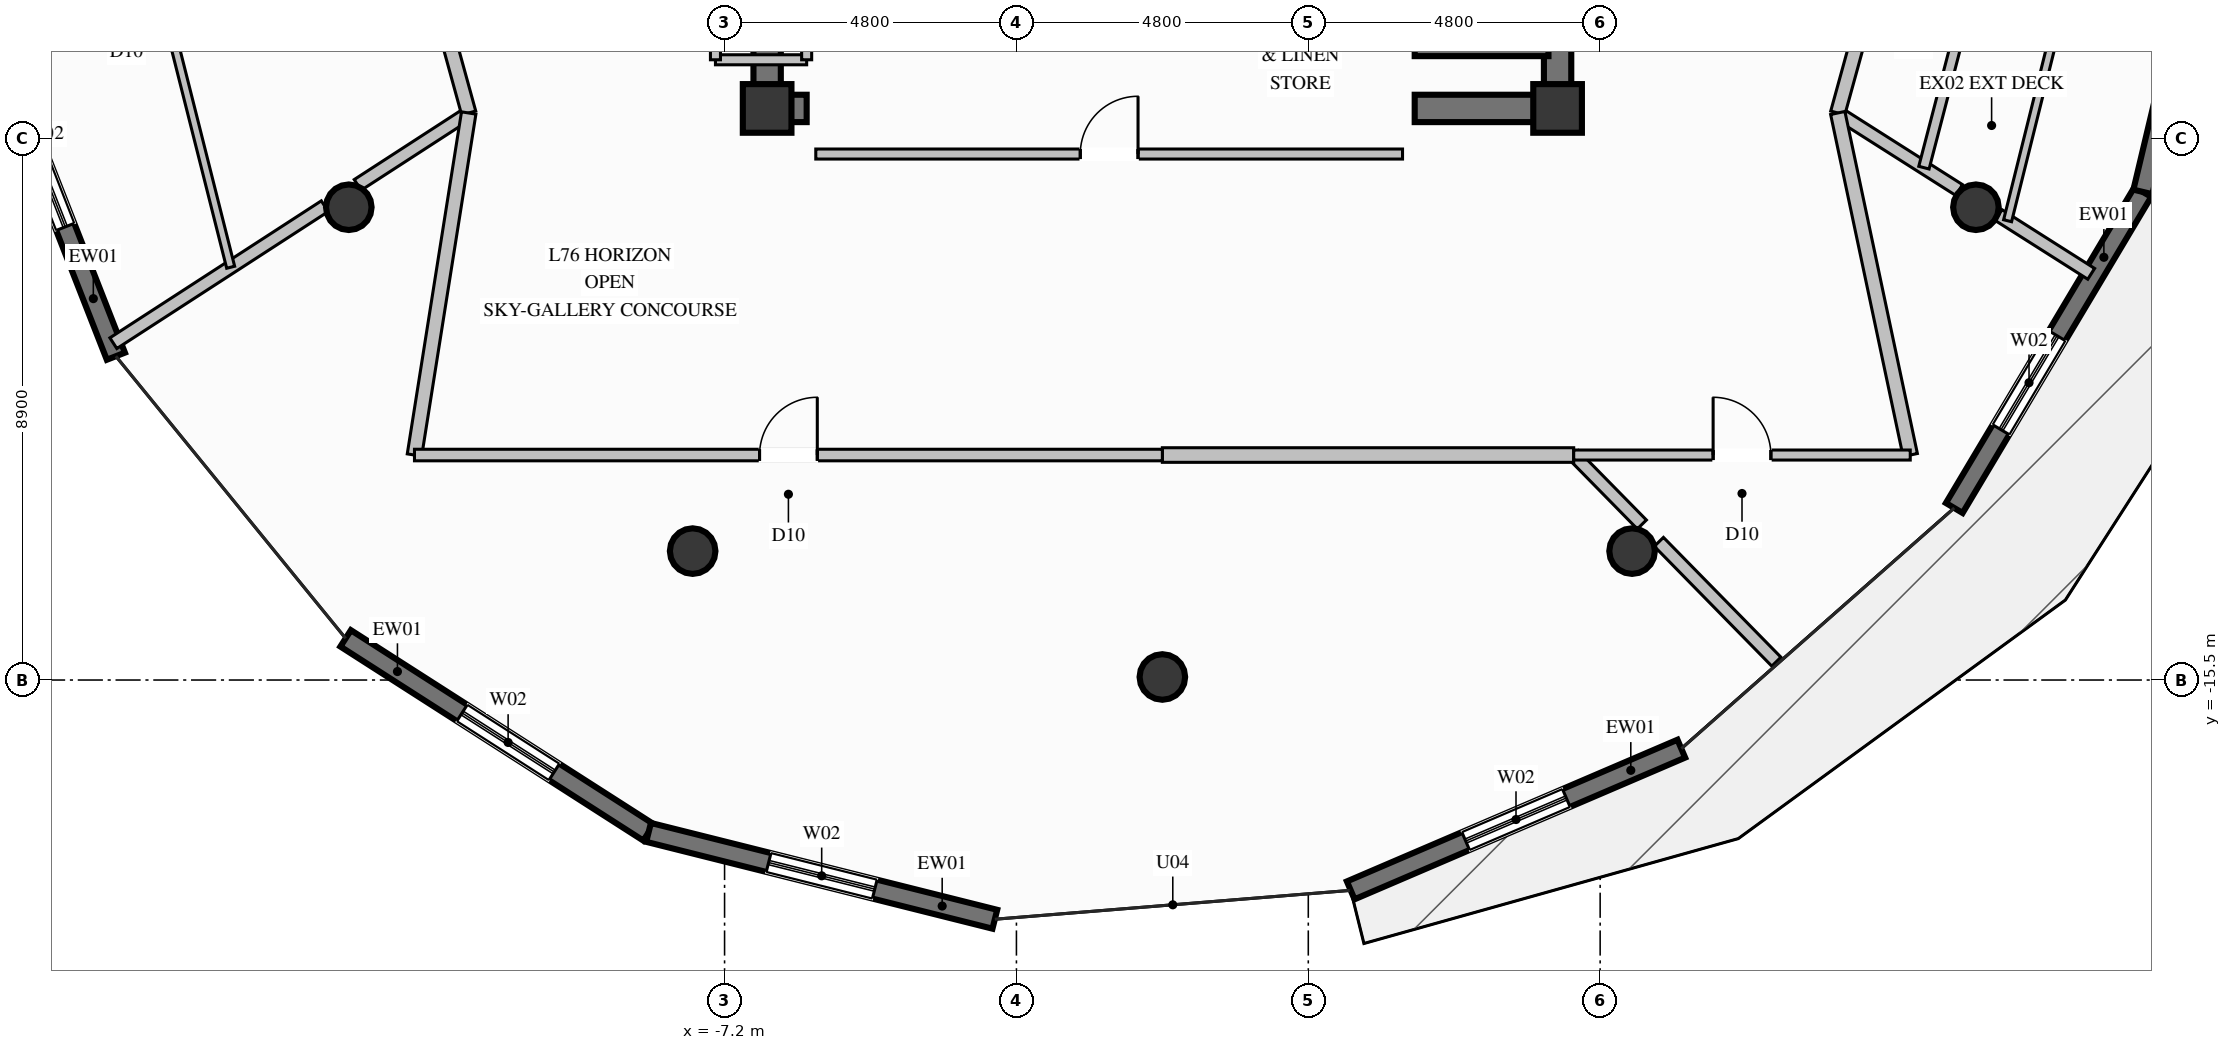
"""IFC4 building model, lengths in metres.
Left out: names, types, materials, properties, quantities, classifications, styles, units other than length and angle.
Written with IfcOpenShell. Run it as: python <this file> out.ifc"""

import sys

from ifc_helpers import new_model, si_unit, direction, frame, frame_2d, origin, origin_2d, place, context, subcontext, project, spatial, rectangle, circle, extrude, element, fill, save


model = new_model("IFC4")
c1 = context("Model", 3, precision=1e-05, world=origin(), true_north=direction((0.0, 1.0)))
c2 = subcontext(c1, "Body", "Model", "MODEL_VIEW")
j1 = project(units=[si_unit("LENGTHUNIT", "METRE"), si_unit("PLANEANGLEUNIT", "RADIAN")], contexts=[c1])
p1 = place(None, origin())
s1 = spatial("IfcSite", under=j1, at=p1, CompositionType="ELEMENT")
p2 = place(p1, origin())
s2 = spatial("IfcBuilding", under=s1, at=p2, CompositionType="ELEMENT")
p3 = place(p2, frame((0.0, 0.0, 293.4)))
s3 = spatial("IfcBuildingStorey", under=s2, at=p3, CompositionType="ELEMENT", Elevation=293.4)
for number, where, z_axis, x_axis in (
    (1, (-6.5, -6.1, 0.0), (0.0, 0.0, 1.0), (1.0, 0.0, 0.0)),
    (2, (6.5, -6.1, 0.0), (0.0, 0.0, 1.0), (1.0, 0.0, 0.0)),
):
    element("IfcColumn", number, at=place(p3, frame(where, z_axis=z_axis, x_axis=x_axis)), inside=s3, PredefinedType="COLUMN", context=c2, shape_type="SweptSolid", body=[
        extrude(rectangle(XDim=0.8, YDim=0.8, at=origin_2d()), origin(), (0.0, 0.0, 1.0), 3.8),
    ])
p4 = place(p3, frame((-6.275, -6.1, 0.0), z_axis=(0.0, 0.0, 1.0), x_axis=(1.0, 0.0, 0.0)))
e3 = element("IfcWall", 3, at=p4, inside=s3, PredefinedType="SHEAR", context=c2, shape_type="SweptSolid", body=[
    extrude(rectangle(XDim=0.425, YDim=0.45, at=frame_2d((0.212, 0.0))), origin(), (0.0, 0.0, 1.0), 3.8),
])
p5 = place(p3, frame((4.15, -6.1, 0.0), z_axis=(0.0, 0.0, 1.0), x_axis=(1.0, 0.0, 0.0)))
e4 = element("IfcWall", 4, at=p5, inside=s3, PredefinedType="SHEAR", context=c2, shape_type="SweptSolid", body=[
    extrude(rectangle(XDim=2.125, YDim=0.45, at=frame_2d((1.062, 0.0))), origin(), (0.0, 0.0, 1.0), 3.8),
])
p6 = place(p3, frame((-6.5, -6.325, 0.0), z_axis=(0.0, 0.0, 1.0), x_axis=(0.0, 1.0, 0.0)))
e5 = element("IfcWall", 5, at=p6, inside=s3, PredefinedType="SHEAR", context=c2, shape_type="SweptSolid", body=[
    extrude(rectangle(XDim=2.975, YDim=0.45, at=frame_2d((1.487, 0.0))), origin(), (0.0, 0.0, 1.0), 3.8),
])
p7 = place(p3, frame((6.5, -6.325, 0.0), z_axis=(0.0, 0.0, 1.0), x_axis=(0.0, 1.0, 0.0)))
e6 = element("IfcWall", 6, at=p7, inside=s3, PredefinedType="SHEAR", context=c2, shape_type="SweptSolid", body=[
    extrude(rectangle(XDim=3.975, YDim=0.45, at=frame_2d((1.987, 0.0))), origin(), (0.0, 0.0, 1.0), 3.8),
])
for number, where, z_axis, x_axis in (
    (7, (-13.38, -7.725, 0.0), (0.0, 0.0, 1.0), (1.0, 0.0, 0.0)),
    (8, (-7.725, -13.38, 0.0), (0.0, 0.0, 1.0), (1.0, 0.0, 0.0)),
    (9, (0.0, -15.45, 0.0), (0.0, 0.0, 1.0), (1.0, 0.0, 0.0)),
    (10, (7.725, -13.38, 0.0), (0.0, 0.0, 1.0), (1.0, 0.0, 0.0)),
    (11, (13.38, -7.725, 0.0), (0.0, 0.0, 1.0), (1.0, 0.0, 0.0)),
):
    element("IfcColumn", number, at=place(p3, frame(where, z_axis=z_axis, x_axis=x_axis)), inside=s3, PredefinedType="COLUMN", context=c2, shape_type="SweptSolid", body=[
        extrude(circle(Radius=0.375, at=origin_2d()), origin(), (0.0, 0.0, 1.0), 3.8),
    ])
p8 = place(p3, frame((8.535, -16.629, 0.0), z_axis=(0.0, 0.0, 1.0), x_axis=(-0.919149299583, -0.393909336112, 0.0)))
e12 = element("IfcWall", 12, at=p8, inside=s3, PredefinedType="SOLIDWALL", context=c2, shape_type="SweptSolid", body=[
    extrude(rectangle(XDim=5.915, YDim=0.32, at=frame_2d((2.958, 0.0))), origin(), (0.0, 0.0, 1.0), 3.57),
])
p9 = place(p8, frame((2.058, 0.0, 0.35)))
e13 = element("IfcOpeningElement", 13, at=p9, cuts=e12, PredefinedType="OPENING", context=c2, shape_type="SweptSolid", body=[
    extrude(rectangle(XDim=1.8, YDim=2.6, at=frame_2d((0.9, 1.3))), frame((0.0, 0.17, 0.0), z_axis=(0.0, -1.0, 0.0), x_axis=(1.0, 0.0, 0.0)), (0.0, 0.0, 1.0), 0.34),
])
p10 = place(p3, frame((16.126, -7.473, 0.0), z_axis=(0.0, 0.0, 1.0), x_axis=(-0.512459907896, -0.858711152134, 0.0)))
e14 = element("IfcWall", 14, at=p10, inside=s3, PredefinedType="SOLIDWALL", context=c2, shape_type="SweptSolid", body=[
    extrude(rectangle(XDim=6.053, YDim=0.32, at=frame_2d((3.027, 0.0))), origin(), (0.0, 0.0, 1.0), 3.57),
])
p11 = place(p10, frame((2.754, 0.0, 0.35)))
e15 = element("IfcOpeningElement", 15, at=p11, cuts=e14, PredefinedType="OPENING", context=c2, shape_type="SweptSolid", body=[
    extrude(rectangle(XDim=1.8, YDim=2.6, at=frame_2d((0.9, 1.3))), frame((0.0, 0.17, 0.0), z_axis=(0.0, -1.0, 0.0), x_axis=(1.0, 0.0, 0.0)), (0.0, 0.0, 1.0), 0.34),
])
p12 = place(p3, frame((17.536, -1.543, 0.0), z_axis=(0.0, 0.0, 1.0), x_axis=(-0.23131366192, -0.972879226733, 0.0)))
e16 = element("IfcWall", 16, at=p12, inside=s3, PredefinedType="SOLIDWALL", context=c2, shape_type="SweptSolid", body=[
    extrude(rectangle(XDim=6.095, YDim=0.32, at=frame_2d((3.048, 0.0))), origin(), (0.0, 0.0, 1.0), 3.57),
])
p13 = place(p12, frame((2.498, 0.0, 0.0)))
e17 = element("IfcOpeningElement", 17, at=p13, cuts=e16, PredefinedType="OPENING", context=c2, shape_type="SweptSolid", body=[
    extrude(rectangle(XDim=1.1, YDim=2.2, at=frame_2d((0.55, 1.1))), frame((0.0, 0.17, 0.0), z_axis=(0.0, -1.0, 0.0), x_axis=(1.0, 0.0, 0.0)), (0.0, 0.0, 1.0), 0.34),
])
p14 = place(p3, frame((-17.211, -10.175, 0.0), z_axis=(0.0, 0.0, 1.0), x_axis=(-0.364580296342, 0.931171953787, 0.0)))
e18 = element("IfcWall", 18, at=p14, inside=s3, PredefinedType="SOLIDWALL", context=c2, shape_type="SweptSolid", body=[
    extrude(rectangle(XDim=6.054, YDim=0.32, at=frame_2d((3.027, 0.0))), origin(), (0.0, 0.0, 1.0), 3.57),
])
p15 = place(p14, frame((2.284, 0.0, 0.35)))
e19 = element("IfcOpeningElement", 19, at=p15, cuts=e18, PredefinedType="OPENING", context=c2, shape_type="SweptSolid", body=[
    extrude(rectangle(XDim=1.8, YDim=2.6, at=frame_2d((0.9, 1.3))), frame((0.0, 0.17, 0.0), z_axis=(0.0, -1.0, 0.0), x_axis=(1.0, 0.0, 0.0)), (0.0, 0.0, 1.0), 0.34),
])
p16 = place(p3, frame((-8.45, -18.006, 0.0), z_axis=(0.0, 0.0, 1.0), x_axis=(-0.84206224666, 0.539380359997, 0.0)))
e20 = element("IfcWall", 20, at=p16, inside=s3, PredefinedType="SOLIDWALL", context=c2, shape_type="SweptSolid", body=[
    extrude(rectangle(XDim=5.916, YDim=0.32, at=frame_2d((2.958, 0.0))), origin(), (0.0, 0.0, 1.0), 3.57),
])
p17 = place(p16, frame((1.843, 0.0, 0.35)))
e21 = element("IfcOpeningElement", 21, at=p17, cuts=e20, PredefinedType="OPENING", context=c2, shape_type="SweptSolid", body=[
    extrude(rectangle(XDim=1.8, YDim=2.6, at=frame_2d((0.9, 1.3))), frame((0.0, 0.17, 0.0), z_axis=(0.0, -1.0, 0.0), x_axis=(1.0, 0.0, 0.0)), (0.0, 0.0, 1.0), 0.34),
])
p18 = place(p3, frame((-2.755, -19.434, 0.0), z_axis=(0.0, 0.0, 1.0), x_axis=(-0.969973492968, 0.24321065548, 0.0)))
e22 = element("IfcWall", 22, at=p18, inside=s3, PredefinedType="SOLIDWALL", context=c2, shape_type="SweptSolid", body=[
    extrude(rectangle(XDim=5.871, YDim=0.32, at=frame_2d((2.936, 0.0))), origin(), (0.0, 0.0, 1.0), 3.57),
])
p19 = place(p18, frame((2.036, 0.0, 0.35)))
e23 = element("IfcOpeningElement", 23, at=p19, cuts=e22, PredefinedType="OPENING", context=c2, shape_type="SweptSolid", body=[
    extrude(rectangle(XDim=1.8, YDim=2.6, at=frame_2d((0.9, 1.3))), frame((0.0, 0.17, 0.0), z_axis=(0.0, -1.0, 0.0), x_axis=(1.0, 0.0, 0.0)), (0.0, 0.0, 1.0), 0.34),
])
p20 = place(p3, frame((4.15, -5.1, 0.0), z_axis=(0.0, 0.0, 1.0), x_axis=(1.0, 0.0, 0.0)))
e24 = element("IfcWall", 24, at=p20, inside=s3, PredefinedType="SOLIDWALL", context=c2, shape_type="SweptSolid", body=[
    extrude(rectangle(XDim=2.2, YDim=0.28, at=frame_2d((1.1, 0.0))), origin(), (0.0, 0.0, 1.0), 3.57),
])
p21 = place(p3, frame((-7.35, -5.3, 0.0), z_axis=(0.0, 0.0, 1.0), x_axis=(1.0, 0.0, 0.0)))
e25 = element("IfcWall", 25, at=p21, inside=s3, PredefinedType="PARTITIONING", context=c2, shape_type="SweptSolid", body=[
    extrude(rectangle(XDim=1.5, YDim=0.165, at=frame_2d((0.75, 0.0))), origin(), (0.0, 0.0, 1.0), 2.655),
])
p22 = place(p3, frame((-5.85, -5.3, 0.0), z_axis=(0.0, 0.0, 1.0), x_axis=(0.0, 1.0, 0.0)))
e26 = element("IfcWall", 26, at=p22, inside=s3, PredefinedType="PARTITIONING", context=c2, shape_type="SweptSolid", body=[
    extrude(rectangle(XDim=2.5, YDim=0.165, at=frame_2d((1.25, 0.0))), origin(), (0.0, 0.0, 1.0), 2.655),
])
p23 = place(p3, frame((-7.35, -2.8, 0.0), z_axis=(0.0, 0.0, 1.0), x_axis=(0.0, -1.0, 0.0)))
e27 = element("IfcWall", 27, at=p23, inside=s3, PredefinedType="PARTITIONING", context=c2, shape_type="SweptSolid", body=[
    extrude(rectangle(XDim=2.5, YDim=0.165, at=frame_2d((1.25, 0.0))), origin(), (0.0, 0.0, 1.0), 3.57),
])
p24 = place(p23, frame((0.775, 0.0, 0.0)))
e28 = element("IfcOpeningElement", 28, at=p24, cuts=e27, PredefinedType="OPENING", context=c2, shape_type="SweptSolid", body=[
    extrude(rectangle(XDim=0.95, YDim=2.1, at=frame_2d((0.475, 1.05))), frame((0.0, 0.093, 0.0), z_axis=(0.0, -1.0, 0.0), x_axis=(1.0, 0.0, 0.0)), (0.0, 0.0, 1.0), 0.185),
])
p25 = place(p3, frame((-5.7, -6.85, 0.0), z_axis=(0.0, 0.0, 1.0), x_axis=(1.0, 0.0, 0.0)))
e29 = element("IfcWall", 29, at=p25, inside=s3, PredefinedType="PARTITIONING", context=c2, shape_type="SweptSolid", body=[
    extrude(rectangle(XDim=9.65, YDim=0.165, at=frame_2d((4.825, 0.0))), origin(), (0.0, 0.0, 1.0), 2.655),
])
p26 = place(p25, frame((4.35, 0.0, 0.0)))
e30 = element("IfcOpeningElement", 30, at=p26, cuts=e29, PredefinedType="OPENING", context=c2, shape_type="SweptSolid", body=[
    extrude(rectangle(XDim=0.95, YDim=2.1, at=frame_2d((0.475, 1.05))), frame((0.0, 0.093, 0.0), z_axis=(0.0, -1.0, 0.0), x_axis=(1.0, 0.0, 0.0)), (0.0, 0.0, 1.0), 0.185),
])
p27 = place(p3, frame((-11.408, -6.175, 0.0), z_axis=(0.0, 0.0, 1.0), x_axis=(-0.83928100766, -0.543697885026, 0.0)))
e31 = element("IfcWall", 31, at=p27, inside=s3, PredefinedType="PARTITIONING", context=c2, shape_type="SweptSolid", body=[
    extrude(rectangle(XDim=2.176, YDim=0.21, at=frame_2d((1.088, 0.0))), origin(), (0.0, 0.0, 1.0), 3.011),
])
p28 = place(p3, frame((-13.775, -7.708, 0.0), z_axis=(0.0, 0.0, 1.0), x_axis=(-0.83923166981, -0.543774037987, 0.0)))
e32 = element("IfcWall", 32, at=p28, inside=s3, PredefinedType="PARTITIONING", context=c2, shape_type="SweptSolid", body=[
    extrude(rectangle(XDim=4.143, YDim=0.21, at=frame_2d((2.072, 0.0))), origin(), (0.0, 0.0, 1.0), 3.57),
])
p29 = place(p3, frame((11.108, -6.175, 0.0), z_axis=(0.0, 0.0, 1.0), x_axis=(0.84431145075, -0.535852754152, 0.0)))
e33 = element("IfcWall", 33, at=p29, inside=s3, PredefinedType="PARTITIONING", context=c2, shape_type="SweptSolid", body=[
    extrude(rectangle(XDim=2.364, YDim=0.21, at=frame_2d((1.182, 0.0))), origin(), (0.0, 0.0, 1.0), 3.011),
])
p30 = place(p3, frame((13.753, -7.854, 0.0), z_axis=(0.0, 0.0, 1.0), x_axis=(0.844435400929, -0.535657403251, 0.0)))
e34 = element("IfcWall", 34, at=p30, inside=s3, PredefinedType="PARTITIONING", context=c2, shape_type="SweptSolid", body=[
    extrude(rectangle(XDim=1.803, YDim=0.21, at=frame_2d((0.902, 0.0))), origin(), (0.0, 0.0, 1.0), 3.57),
])
p31 = place(p3, frame((-13.15, 0.15, 0.0), z_axis=(0.0, 0.0, 1.0), x_axis=(0.265522333736, -0.964104709193, 0.0)))
e35 = element("IfcWall", 35, at=p31, inside=s3, PredefinedType="PARTITIONING", context=c2, shape_type="SweptSolid", body=[
    extrude(rectangle(XDim=6.561, YDim=0.24, at=frame_2d((3.28, 0.0))), origin(), (0.0, 0.0, 1.0), 3.57),
])
p32 = place(p3, frame((-17.532, 0.049, 0.0), z_axis=(0.0, 0.0, 1.0), x_axis=(0.244487012049, -0.969652567129, 0.0)))
e36 = element("IfcWall", 36, at=p32, inside=s3, PredefinedType="PARTITIONING", context=c2, shape_type="SweptSolid", body=[
    extrude(rectangle(XDim=9.035, YDim=0.135, at=frame_2d((4.518, 0.0))), origin(), (0.0, 0.0, 1.0), 3.57),
])
p33 = place(p32, frame((4.043, 0.0, 0.0)))
e37 = element("IfcOpeningElement", 37, at=p33, cuts=e36, PredefinedType="OPENING", context=c2, shape_type="SweptSolid", body=[
    extrude(rectangle(XDim=0.95, YDim=2.1, at=frame_2d((0.475, 1.05))), frame((0.0, 0.078, 0.0), z_axis=(0.0, -1.0, 0.0), x_axis=(1.0, 0.0, 0.0)), (0.0, 0.0, 1.0), 0.155),
])
p34 = place(p3, frame((11.108, -6.175, 0.0), z_axis=(0.0, 0.0, 1.0), x_axis=(0.265664996475, 0.964065407349, 0.0)))
e38 = element("IfcWall", 38, at=p34, inside=s3, PredefinedType="PARTITIONING", context=c2, shape_type="SweptSolid", body=[
    extrude(rectangle(XDim=2.756, YDim=0.24, at=frame_2d((1.378, 0.0))), origin(), (0.0, 0.0, 1.0), 3.57),
])
p35 = place(p3, frame((12.525, -7.074, 0.0), z_axis=(0.0, 0.0, 1.0), x_axis=(0.252172913421, 0.967682190462, 0.0)))
e39 = element("IfcWall", 39, at=p35, inside=s3, PredefinedType="PLUMBINGWALL", context=c2, shape_type="SweptSolid", body=[
    extrude(rectangle(XDim=3.114, YDim=0.175, at=frame_2d((1.557, 0.0))), origin(), (0.0, 0.0, 1.0), 3.57),
])
p36 = place(p3, frame((13.901, -7.947, 0.0), z_axis=(0.0, 0.0, 1.0), x_axis=(0.241643206993, 0.970365168642, 0.0)))
e40 = element("IfcWall", 40, at=p36, inside=s3, PredefinedType="PARTITIONING", context=c2, shape_type="SweptSolid", body=[
    extrude(rectangle(XDim=8.24, YDim=0.135, at=frame_2d((4.12, 0.0))), origin(), (0.0, 0.0, 1.0), 3.138),
])
p37 = place(p36, frame((3.645, 0.0, 0.0)))
e41 = element("IfcOpeningElement", 41, at=p37, cuts=e40, PredefinedType="OPENING", context=c2, shape_type="SweptSolid", body=[
    extrude(rectangle(XDim=0.95, YDim=2.1, at=frame_2d((0.475, 1.05))), frame((0.0, 0.078, 0.0), z_axis=(0.0, -1.0, 0.0), x_axis=(1.0, 0.0, 0.0)), (0.0, 0.0, 1.0), 0.155),
])
p38 = place(p3, frame((6.765, -11.8, 0.0), z_axis=(0.0, 0.0, 1.0), x_axis=(0.700592904853, -0.713561196864, 0.0)))
e42 = element("IfcWall", 42, at=p38, inside=s3, PredefinedType="PARTITIONING", context=c2, shape_type="SweptSolid", body=[
    extrude(rectangle(XDim=1.6, YDim=0.21, at=frame_2d((0.8, 0.0))), origin(), (0.0, 0.0, 1.0), 3.57),
])
p39 = place(p3, frame((8.166, -13.228, 0.0), z_axis=(0.0, 0.0, 1.0), x_axis=(0.700171371024, -0.713974825325, 0.0)))
e43 = element("IfcWall", 43, at=p39, inside=s3, PredefinedType="PARTITIONING", context=c2, shape_type="SweptSolid", body=[
    extrude(rectangle(XDim=2.759, YDim=0.21, at=frame_2d((1.38, 0.0))), origin(), (0.0, 0.0, 1.0), 3.57),
])
p40 = place(p3, frame((-11.408, -6.175, 0.0), z_axis=(0.0, 0.0, 1.0), x_axis=(-0.156636128869, -0.987656379078, 0.0)))
e44 = element("IfcWall", 44, at=p40, inside=s3, PredefinedType="PARTITIONING", context=c2, shape_type="SweptSolid", body=[
    extrude(rectangle(XDim=5.695, YDim=0.24, at=frame_2d((2.848, 0.0))), origin(), (0.0, 0.0, 1.0), 3.57),
])
p41 = place(p3, frame((0.0, -11.8, 0.0), z_axis=(0.0, 0.0, 1.0), x_axis=(1.0, 0.0, 0.0)))
e45 = element("IfcWall", 45, at=p41, inside=s3, PredefinedType="PARTITIONING", context=c2, shape_type="SweptSolid", body=[
    extrude(rectangle(XDim=6.765, YDim=0.24, at=frame_2d((3.382, 0.0))), origin(), (0.0, 0.0, 1.0), 3.57),
])
p42 = place(p3, frame((-12.3, -11.8, 0.0), z_axis=(0.0, 0.0, 1.0), x_axis=(1.0, 0.0, 0.0)))
e46 = element("IfcWall", 46, at=p42, inside=s3, PredefinedType="PARTITIONING", context=c2, shape_type="SweptSolid", body=[
    extrude(rectangle(XDim=12.3, YDim=0.19, at=frame_2d((6.15, 0.0))), origin(), (0.0, 0.0, 1.0), 3.57),
])
p43 = place(p42, frame((5.675, 0.0, 0.0)))
e47 = element("IfcOpeningElement", 47, at=p43, cuts=e46, PredefinedType="OPENING", context=c2, shape_type="SweptSolid", body=[
    extrude(rectangle(XDim=0.95, YDim=2.1, at=frame_2d((0.475, 1.05))), frame((0.0, 0.105, 0.0), z_axis=(0.0, -1.0, 0.0), x_axis=(1.0, 0.0, 0.0)), (0.0, 0.0, 1.0), 0.21),
])
p44 = place(p3, frame((12.3, -11.8, 0.0), z_axis=(0.0, 0.0, 1.0), x_axis=(-0.207330597994, 0.978270935445, 0.0)))
e48 = element("IfcWall", 48, at=p44, inside=s3, PredefinedType="PARTITIONING", context=c2, shape_type="SweptSolid", body=[
    extrude(rectangle(XDim=5.75, YDim=0.24, at=frame_2d((2.875, 0.0))), origin(), (0.0, 0.0, 1.0), 3.57),
])
p45 = place(p3, frame((6.765, -11.8, 0.0), z_axis=(0.0, 0.0, 1.0), x_axis=(1.0, 0.0, 0.0)))
e49 = element("IfcWall", 49, at=p45, inside=s3, PredefinedType="PARTITIONING", context=c2, shape_type="SweptSolid", body=[
    extrude(rectangle(XDim=5.535, YDim=0.165, at=frame_2d((2.768, 0.0))), origin(), (0.0, 0.0, 1.0), 3.57),
])
p46 = place(p45, frame((2.293, 0.0, 0.0)))
e50 = element("IfcOpeningElement", 50, at=p46, cuts=e49, PredefinedType="OPENING", context=c2, shape_type="SweptSolid", body=[
    extrude(rectangle(XDim=0.95, YDim=2.1, at=frame_2d((0.475, 1.05))), frame((0.0, 0.093, 0.0), z_axis=(0.0, -1.0, 0.0), x_axis=(1.0, 0.0, 0.0)), (0.0, 0.0, 1.0), 0.185),
])
p47 = place(p9, origin())
e51 = element("IfcWindow", 51, at=p47, inside=s3, PartitioningType="SINGLE_PANEL", PredefinedType="WINDOW", context=c2, shape_type="SweptSolid", body=[
    extrude(rectangle(XDim=1.8, YDim=2.6, at=frame_2d((0.9, 1.3))), frame((0.0, 0.03, 0.0), z_axis=(0.0, -1.0, 0.0), x_axis=(1.0, 0.0, 0.0)), (0.0, 0.0, 1.0), 0.06),
])
fill(e13, e51)
p48 = place(p11, origin())
e52 = element("IfcWindow", 52, at=p48, inside=s3, PartitioningType="SINGLE_PANEL", PredefinedType="WINDOW", context=c2, shape_type="SweptSolid", body=[
    extrude(rectangle(XDim=1.8, YDim=2.6, at=frame_2d((0.9, 1.3))), frame((0.0, 0.03, 0.0), z_axis=(0.0, -1.0, 0.0), x_axis=(1.0, 0.0, 0.0)), (0.0, 0.0, 1.0), 0.06),
])
fill(e15, e52)
p49 = place(p15, origin())
e53 = element("IfcWindow", 53, at=p49, inside=s3, PartitioningType="SINGLE_PANEL", PredefinedType="WINDOW", context=c2, shape_type="SweptSolid", body=[
    extrude(rectangle(XDim=1.8, YDim=2.6, at=frame_2d((0.9, 1.3))), frame((0.0, 0.03, 0.0), z_axis=(0.0, -1.0, 0.0), x_axis=(1.0, 0.0, 0.0)), (0.0, 0.0, 1.0), 0.06),
])
fill(e19, e53)
p50 = place(p17, origin())
e54 = element("IfcWindow", 54, at=p50, inside=s3, PartitioningType="SINGLE_PANEL", PredefinedType="WINDOW", context=c2, shape_type="SweptSolid", body=[
    extrude(rectangle(XDim=1.8, YDim=2.6, at=frame_2d((0.9, 1.3))), frame((0.0, 0.03, 0.0), z_axis=(0.0, -1.0, 0.0), x_axis=(1.0, 0.0, 0.0)), (0.0, 0.0, 1.0), 0.06),
])
fill(e21, e54)
p51 = place(p19, origin())
e55 = element("IfcWindow", 55, at=p51, inside=s3, PartitioningType="SINGLE_PANEL", PredefinedType="WINDOW", context=c2, shape_type="SweptSolid", body=[
    extrude(rectangle(XDim=1.8, YDim=2.6, at=frame_2d((0.9, 1.3))), frame((0.0, 0.03, 0.0), z_axis=(0.0, -1.0, 0.0), x_axis=(1.0, 0.0, 0.0)), (0.0, 0.0, 1.0), 0.06),
])
fill(e23, e55)
p52 = place(p26, origin())
e56 = element("IfcDoor", 56, at=p52, inside=s3, OperationType="SINGLE_SWING_RIGHT", PredefinedType="DOOR", context=c2, shape_type="SweptSolid", body=[
    extrude(rectangle(XDim=0.95, YDim=2.1, at=frame_2d((0.475, 1.05))), frame((0.0, 0.025, 0.0), z_axis=(0.0, -1.0, 0.0), x_axis=(1.0, 0.0, 0.0)), (0.0, 0.0, 1.0), 0.05),
])
fill(e30, e56)
p53 = place(p43, origin())
e57 = element("IfcDoor", 57, at=p53, inside=s3, OperationType="SINGLE_SWING_RIGHT", PredefinedType="DOOR", context=c2, shape_type="SweptSolid", body=[
    extrude(rectangle(XDim=0.95, YDim=2.1, at=frame_2d((0.475, 1.05))), frame((0.0, 0.025, 0.0), z_axis=(0.0, -1.0, 0.0), x_axis=(1.0, 0.0, 0.0)), (0.0, 0.0, 1.0), 0.05),
])
fill(e47, e57)
p54 = place(p46, origin())
e58 = element("IfcDoor", 58, at=p54, inside=s3, OperationType="SINGLE_SWING_LEFT", PredefinedType="DOOR", context=c2, shape_type="SweptSolid", body=[
    extrude(rectangle(XDim=0.95, YDim=2.1, at=frame_2d((0.475, 1.05))), frame((0.0, 0.025, 0.0), z_axis=(0.0, -1.0, 0.0), x_axis=(1.0, 0.0, 0.0)), (0.0, 0.0, 1.0), 0.05),
])
fill(e50, e58)
save(model, sys.argv[1])
